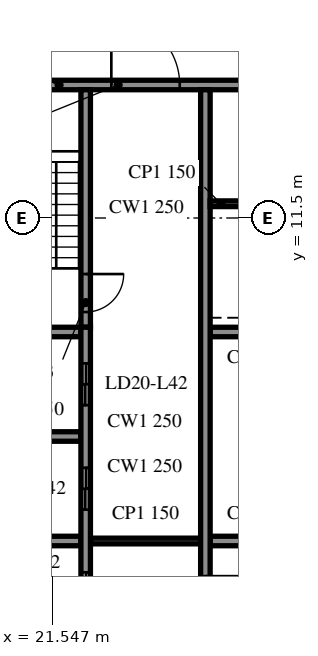
"""IFC4 building model, lengths in metres.
Left out: names, types, materials, properties, quantities, classifications, styles, units other than length and angle.
Written with IfcOpenShell. Run it as: python <this file> out.ifc"""

import sys

from ifc_helpers import new_model, si_unit, direction, frame, frame_2d, origin, place, context, subcontext, project, spatial, rectangle, extrude, element, fill, save


model = new_model("IFC4")
c1 = context("Model", 3, precision=1e-05, world=origin(), true_north=direction((0.0, 1.0)))
c2 = subcontext(c1, "Body", "Model", "MODEL_VIEW")
j1 = project(units=[si_unit("LENGTHUNIT", "METRE"), si_unit("PLANEANGLEUNIT", "RADIAN")], contexts=[c1])
p1 = place(None, origin())
s1 = spatial("IfcSite", under=j1, at=p1, CompositionType="ELEMENT")
p2 = place(p1, origin())
s2 = spatial("IfcBuilding", under=s1, at=p2, CompositionType="ELEMENT")
p3 = place(p2, frame((0.0, 0.0, 178.2)))
s3 = spatial("IfcBuildingStorey", under=s2, at=p3, CompositionType="ELEMENT", Elevation=178.2)
p4 = place(p3, frame((19.45, 15.0, 0.0), z_axis=(0.0, 0.0, 1.0), x_axis=(1.0, 0.0, 0.0)))
e1 = element("IfcWall", 1, at=p4, inside=s3, PredefinedType="SOLIDWALL", context=c2, shape_type="SweptSolid", body=[
    extrude(rectangle(XDim=9.1, YDim=0.25, at=frame_2d((4.55, 0.0))), origin(), (0.0, 0.0, 1.0), 3.46),
])
p5 = place(p4, frame((3.65, 0.0, 0.0)))
e2 = element("IfcOpeningElement", 2, at=p5, cuts=e1, PredefinedType="OPENING", context=c2, shape_type="SweptSolid", body=[
    extrude(rectangle(XDim=1.8, YDim=2.1, at=frame_2d((0.9, 1.05))), frame((0.0, 0.135, 0.0), z_axis=(0.0, -1.0, 0.0), x_axis=(1.0, 0.0, 0.0)), (0.0, 0.0, 1.0), 0.27),
])
p6 = place(p3, frame((22.425, -8.875, 0.0), z_axis=(0.0, 0.0, 1.0), x_axis=(0.0, 1.0, 0.0)))
e3 = element("IfcWall", 3, at=p6, inside=s3, PredefinedType="SOLIDWALL", context=c2, shape_type="SweptSolid", body=[
    extrude(rectangle(XDim=17.5, YDim=0.25, at=frame_2d((8.75, 0.0))), origin(), (0.0, 0.0, 1.0), 3.46),
])
p7 = place(p6, frame((7.2, 0.0, 0.0)))
e4 = element("IfcOpeningElement", 4, at=p7, cuts=e3, PredefinedType="OPENING", context=c2, shape_type="SweptSolid", body=[
    extrude(rectangle(XDim=1.1, YDim=2.1, at=frame_2d((0.55, 1.05))), frame((0.0, 0.135, 0.0), z_axis=(0.0, -1.0, 0.0), x_axis=(1.0, 0.0, 0.0)), (0.0, 0.0, 1.0), 0.27),
])
p8 = place(p6, frame((9.95, 0.0, 0.0)))
e5 = element("IfcOpeningElement", 5, at=p8, cuts=e3, PredefinedType="OPENING", context=c2, shape_type="SweptSolid", body=[
    extrude(rectangle(XDim=1.1, YDim=2.1, at=frame_2d((0.55, 1.05))), frame((0.0, 0.135, 0.0), z_axis=(0.0, -1.0, 0.0), x_axis=(1.0, 0.0, 0.0)), (0.0, 0.0, 1.0), 0.27),
])
p9 = place(p6, frame((12.7, 0.0, 0.0)))
e6 = element("IfcOpeningElement", 6, at=p9, cuts=e3, PredefinedType="OPENING", context=c2, shape_type="SweptSolid", body=[
    extrude(rectangle(XDim=1.1, YDim=2.1, at=frame_2d((0.55, 1.05))), frame((0.0, 0.135, 0.0), z_axis=(0.0, -1.0, 0.0), x_axis=(1.0, 0.0, 0.0)), (0.0, 0.0, 1.0), 0.27),
])
p10 = place(p6, frame((15.45, 0.0, 0.0)))
e7 = element("IfcOpeningElement", 7, at=p10, cuts=e3, PredefinedType="OPENING", context=c2, shape_type="SweptSolid", body=[
    extrude(rectangle(XDim=1.1, YDim=2.1, at=frame_2d((0.55, 1.05))), frame((0.0, 0.135, 0.0), z_axis=(0.0, -1.0, 0.0), x_axis=(1.0, 0.0, 0.0)), (0.0, 0.0, 1.0), 0.27),
])
p11 = place(p6, frame((0.712, 0.0, 0.0)))
e8 = element("IfcOpeningElement", 8, at=p11, cuts=e3, PredefinedType="OPENING", context=c2, shape_type="SweptSolid", body=[
    extrude(rectangle(XDim=0.9, YDim=2.1, at=frame_2d((0.45, 1.05))), frame((0.0, 0.135, 0.0), z_axis=(0.0, -1.0, 0.0), x_axis=(1.0, 0.0, 0.0)), (0.0, 0.0, 1.0), 0.27),
])
p12 = place(p6, frame((3.788, 0.0, 0.0)))
e9 = element("IfcOpeningElement", 9, at=p12, cuts=e3, PredefinedType="OPENING", context=c2, shape_type="SweptSolid", body=[
    extrude(rectangle(XDim=0.9, YDim=2.1, at=frame_2d((0.45, 1.05))), frame((0.0, 0.135, 0.0), z_axis=(0.0, -1.0, 0.0), x_axis=(1.0, 0.0, 0.0)), (0.0, 0.0, 1.0), 0.27),
])
p13 = place(p3, frame((22.425, 14.875, 0.0), z_axis=(0.0, 0.0, 1.0), x_axis=(0.0, -1.0, 0.0)))
e10 = element("IfcWall", 10, at=p13, inside=s3, PredefinedType="SOLIDWALL", context=c2, shape_type="SweptSolid", body=[
    extrude(rectangle(XDim=6.25, YDim=0.25, at=frame_2d((3.125, 0.0))), origin(), (0.0, 0.0, 1.0), 3.46),
])
p14 = place(p13, frame((4.85, 0.0, 0.0)))
e11 = element("IfcOpeningElement", 11, at=p14, cuts=e10, PredefinedType="OPENING", context=c2, shape_type="SweptSolid", body=[
    extrude(rectangle(XDim=1.0, YDim=2.1, at=frame_2d((0.5, 1.05))), frame((0.0, 0.135, 0.0), z_axis=(0.0, -1.0, 0.0), x_axis=(1.0, 0.0, 0.0)), (0.0, 0.0, 1.0), 0.27),
])
p15 = place(p3, frame((25.575, 14.875, 0.0), z_axis=(0.0, 0.0, 1.0), x_axis=(0.0, -1.0, 0.0)))
e12 = element("IfcWall", 12, at=p15, inside=s3, PredefinedType="SOLIDWALL", context=c2, shape_type="SweptSolid", body=[
    extrude(rectangle(XDim=17.5, YDim=0.25, at=frame_2d((8.75, 0.0))), origin(), (0.0, 0.0, 1.0), 3.46),
])
p16 = place(p15, frame((15.45, 0.0, 0.0)))
e13 = element("IfcOpeningElement", 13, at=p16, cuts=e12, PredefinedType="OPENING", context=c2, shape_type="SweptSolid", body=[
    extrude(rectangle(XDim=1.1, YDim=2.1, at=frame_2d((0.55, 1.05))), frame((0.0, 0.135, 0.0), z_axis=(0.0, -1.0, 0.0), x_axis=(1.0, 0.0, 0.0)), (0.0, 0.0, 1.0), 0.27),
])
p17 = place(p15, frame((12.8, 0.0, 0.0)))
e14 = element("IfcOpeningElement", 14, at=p17, cuts=e12, PredefinedType="OPENING", context=c2, shape_type="SweptSolid", body=[
    extrude(rectangle(XDim=0.9, YDim=2.1, at=frame_2d((0.45, 1.05))), frame((0.0, 0.135, 0.0), z_axis=(0.0, -1.0, 0.0), x_axis=(1.0, 0.0, 0.0)), (0.0, 0.0, 1.0), 0.27),
])
for number, where, z_axis, x_axis in (
    (15, (19.45, 3.0, 0.0), (0.0, 0.0, 1.0), (1.0, 0.0, 0.0)),
    (16, (19.45, 5.75, 0.0), (0.0, 0.0, 1.0), (1.0, 0.0, 0.0)),
    (17, (19.45, 8.5, 0.0), (0.0, 0.0, 1.0), (1.0, 0.0, 0.0)),
    (18, (25.7, 3.0, 0.0), (0.0, 0.0, 1.0), (1.0, 0.0, 0.0)),
    (19, (25.7, 8.5, 0.0), (0.0, 0.0, 1.0), (1.0, 0.0, 0.0)),
):
    element("IfcWall", number, at=place(p3, frame(where, z_axis=z_axis, x_axis=x_axis)), inside=s3, PredefinedType="SOLIDWALL", context=c2, shape_type="SweptSolid", body=[
        extrude(rectangle(XDim=2.85, YDim=0.25, at=frame_2d((1.425, 0.0))), origin(), (0.0, 0.0, 1.0), 3.46),
    ])
p18 = place(p3, frame((22.55, 3.0, 0.0), z_axis=(0.0, 0.0, 1.0), x_axis=(1.0, 0.0, 0.0)))
e20 = element("IfcWall", 20, at=p18, inside=s3, PredefinedType="PARTITIONING", context=c2, shape_type="SweptSolid", body=[
    extrude(rectangle(XDim=2.9, YDim=0.15, at=frame_2d((1.45, 0.0))), origin(), (0.0, 0.0, 1.0), 3.46),
])
p19 = place(p3, frame((25.7, 11.875, 0.0), z_axis=(0.0, 0.0, 1.0), x_axis=(1.0, 0.0, 0.0)))
e21 = element("IfcWall", 21, at=p19, inside=s3, PredefinedType="PARTITIONING", context=c2, shape_type="SweptSolid", body=[
    extrude(rectangle(XDim=2.85, YDim=0.15, at=frame_2d((1.425, 0.0))), origin(), (0.0, 0.0, 1.0), 3.46),
])
p20 = place(p5, origin())
e22 = element("IfcDoor", 22, at=p20, inside=s3, OperationType="DOUBLE_DOOR_SINGLE_SWING", PredefinedType="DOOR", context=c2, shape_type="SweptSolid", body=[
    extrude(rectangle(XDim=1.8, YDim=2.1, at=frame_2d((0.9, 1.05))), frame((0.0, 0.025, 0.0), z_axis=(0.0, -1.0, 0.0), x_axis=(1.0, 0.0, 0.0)), (0.0, 0.0, 1.0), 0.05),
])
fill(e2, e22)
p21 = place(p8, origin())
e23 = element("IfcDoor", 23, at=p21, inside=s3, OperationType="DOUBLE_DOOR_SLIDING", PredefinedType="DOOR", context=c2, shape_type="SweptSolid", body=[
    extrude(rectangle(XDim=1.1, YDim=2.1, at=frame_2d((0.55, 1.05))), frame((0.0, 0.025, 0.0), z_axis=(0.0, -1.0, 0.0), x_axis=(1.0, 0.0, 0.0)), (0.0, 0.0, 1.0), 0.05),
])
fill(e5, e23)
p22 = place(p9, origin())
e24 = element("IfcDoor", 24, at=p22, inside=s3, OperationType="DOUBLE_DOOR_SLIDING", PredefinedType="DOOR", context=c2, shape_type="SweptSolid", body=[
    extrude(rectangle(XDim=1.1, YDim=2.1, at=frame_2d((0.55, 1.05))), frame((0.0, 0.025, 0.0), z_axis=(0.0, -1.0, 0.0), x_axis=(1.0, 0.0, 0.0)), (0.0, 0.0, 1.0), 0.05),
])
fill(e6, e24)
p23 = place(p10, origin())
e25 = element("IfcDoor", 25, at=p23, inside=s3, OperationType="DOUBLE_DOOR_SLIDING", PredefinedType="DOOR", context=c2, shape_type="SweptSolid", body=[
    extrude(rectangle(XDim=1.1, YDim=2.1, at=frame_2d((0.55, 1.05))), frame((0.0, 0.025, 0.0), z_axis=(0.0, -1.0, 0.0), x_axis=(1.0, 0.0, 0.0)), (0.0, 0.0, 1.0), 0.05),
])
fill(e7, e25)
p24 = place(p14, origin())
e26 = element("IfcDoor", 26, at=p24, inside=s3, OperationType="SINGLE_SWING_LEFT", PredefinedType="DOOR", context=c2, shape_type="SweptSolid", body=[
    extrude(rectangle(XDim=1.0, YDim=2.1, at=frame_2d((0.5, 1.05))), frame((0.0, 0.025, 0.0), z_axis=(0.0, -1.0, 0.0), x_axis=(1.0, 0.0, 0.0)), (0.0, 0.0, 1.0), 0.05),
])
fill(e11, e26)
save(model, sys.argv[1])
